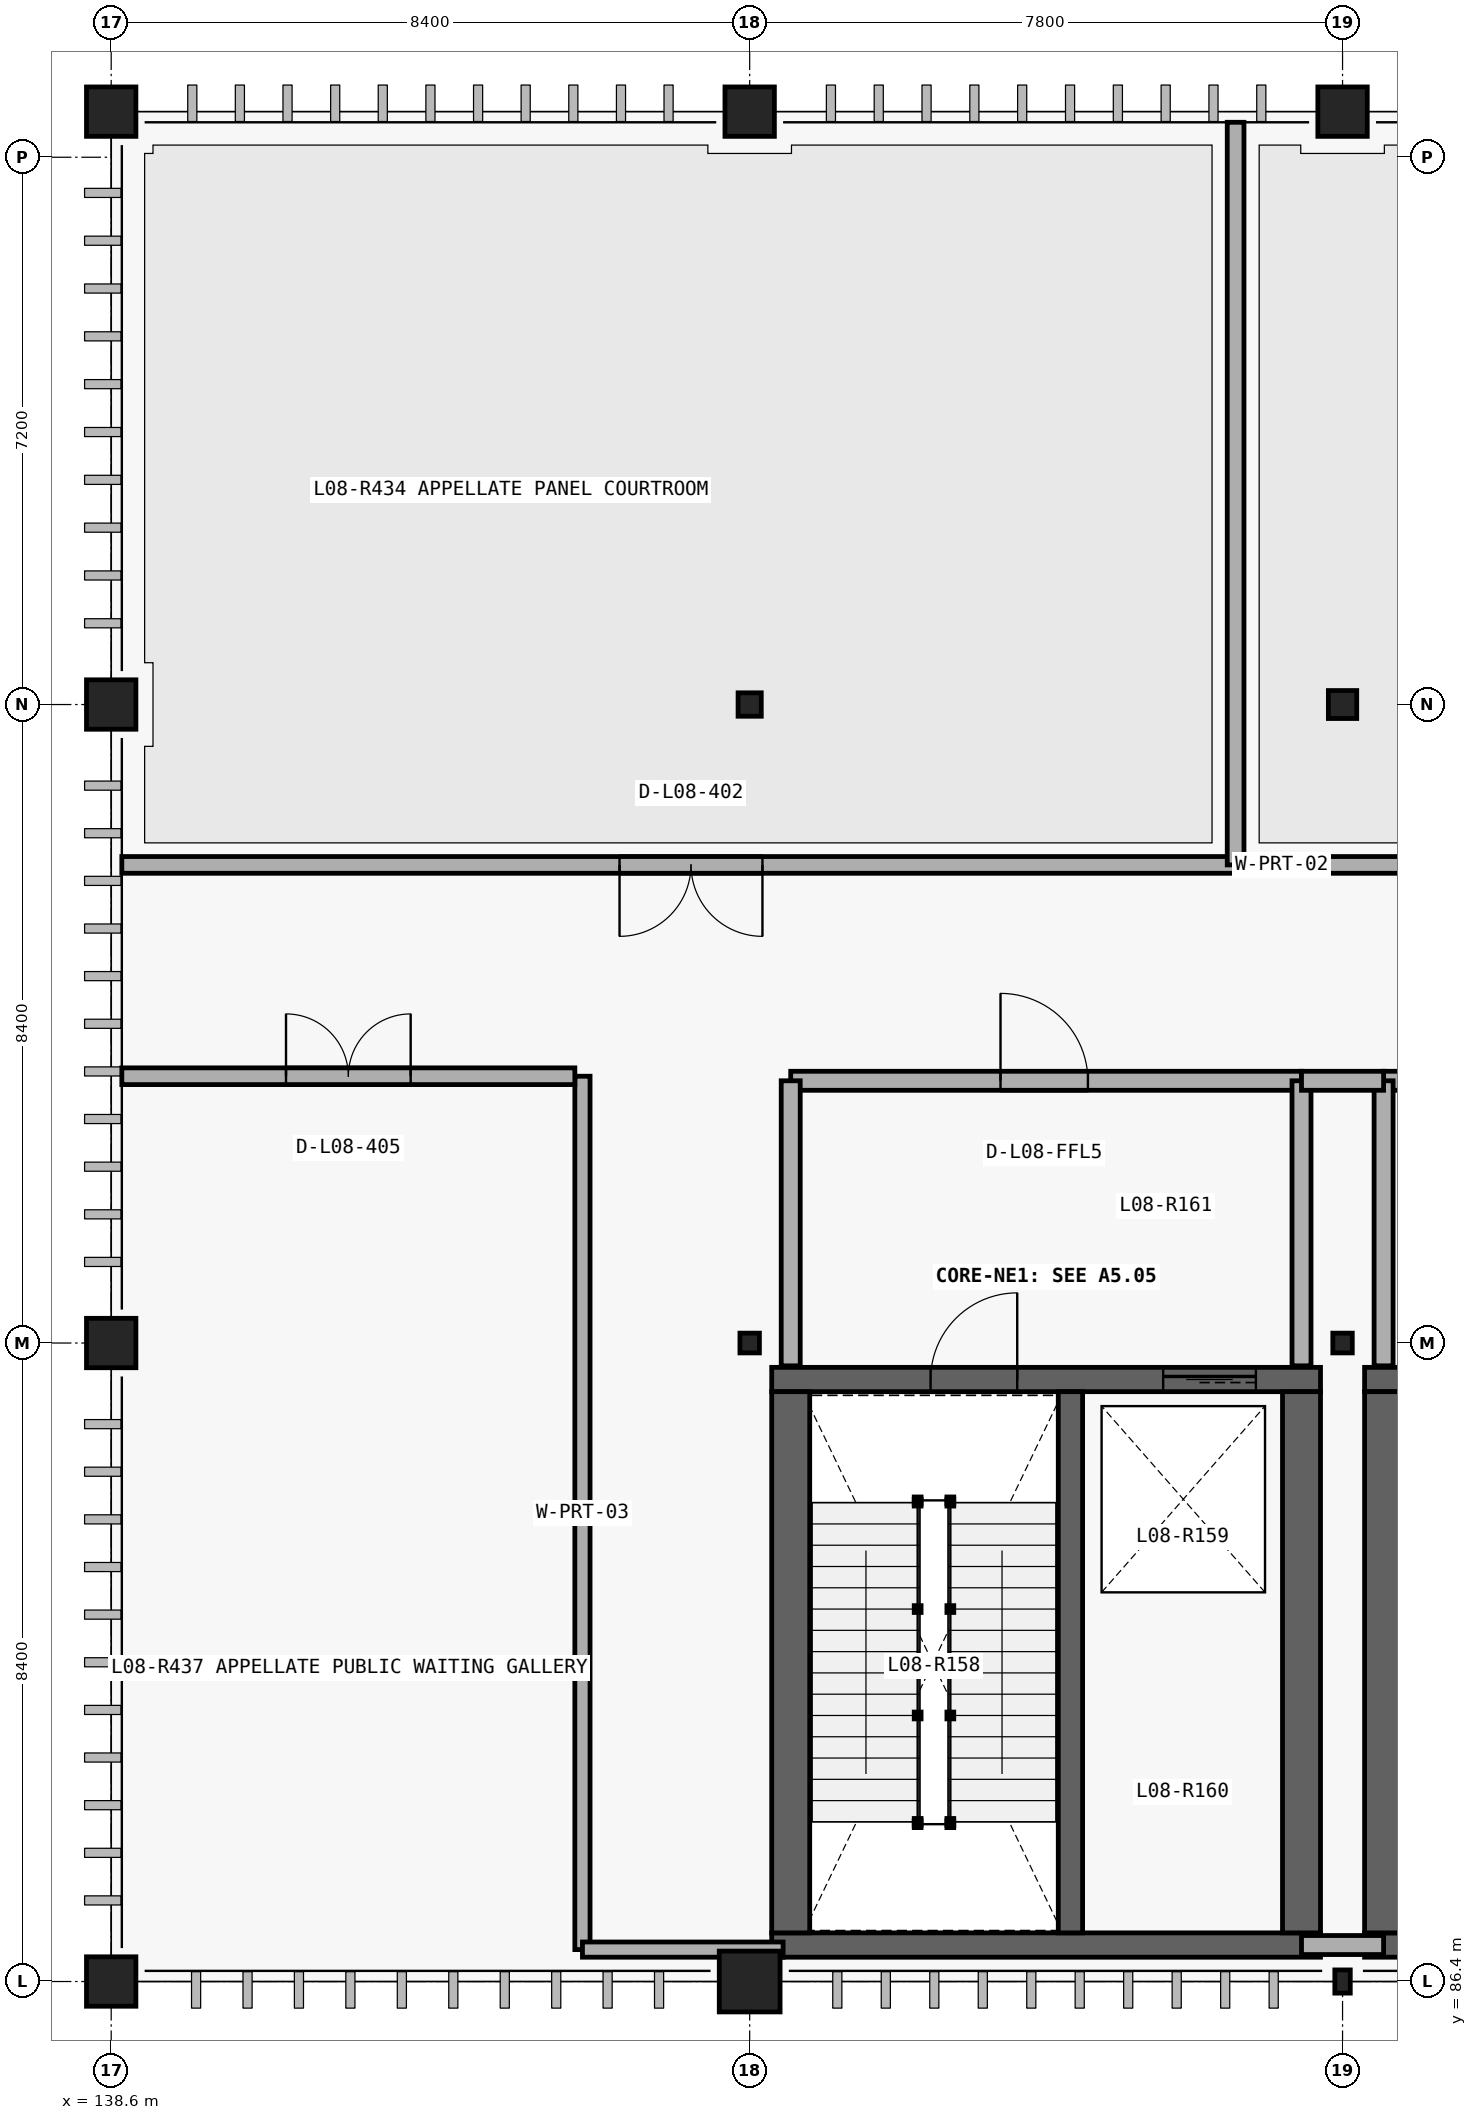
"""IFC4 building model, lengths in metres.
Left out: names, types, materials, properties, quantities, classifications, styles, units other than length and angle.
Written with IfcOpenShell. Run it as: python <this file> out.ifc"""

import sys

from ifc_helpers import new_model, si_unit, direction, frame, frame_2d, origin_with_axes, origin_2d_with_axis, place, context, subcontext, project, spatial, rectangle, hollow_rectangle, circle, i_section, extrude, element, fill, save


model = new_model("IFC4")
c1 = context("Model", 3, precision=1e-05, world=origin_with_axes(), true_north=direction((0.0, 1.0)))
c2 = subcontext(c1, "Body", "Model", "MODEL_VIEW")
j1 = project(units=[si_unit("LENGTHUNIT", "METRE"), si_unit("PLANEANGLEUNIT", "RADIAN")], contexts=[c1])
p1 = place(None, origin_with_axes())
s1 = spatial("IfcSite", under=j1, at=p1, CompositionType="ELEMENT")
p2 = place(p1, origin_with_axes())
s2 = spatial("IfcBuilding", under=s1, at=p2, CompositionType="ELEMENT")
p3 = place(p2, frame((0.0, 0.0, 39.0), z_axis=(0.0, 0.0, 1.0), x_axis=(1.0, 0.0, 0.0)))
s3 = spatial("IfcBuildingStorey", under=s2, at=p3, CompositionType="ELEMENT", Elevation=39.0)
p4 = place(None, frame((147.29, 86.88, 39.0), z_axis=(0.0, 0.0, 1.0), x_axis=(1.0, 0.0, 0.0)))
e1 = element("IfcWall", 1, at=p4, inside=s3, PredefinedType="SHEAR", context=c2, shape_type="SweptSolid", body=[
    extrude(rectangle(XDim=7.22, YDim=0.32, at=frame_2d((3.61, 0.0), x_axis=(1.0, 0.0))), origin_with_axes(), (0.0, 0.0, 1.0), 4.5),
])
p5 = place(None, frame((154.51, 94.32, 39.0), z_axis=(0.0, 0.0, 1.0), x_axis=(-1.0, 0.0, 0.0)))
e2 = element("IfcWall", 2, at=p5, inside=s3, PredefinedType="SHEAR", context=c2, shape_type="SweptSolid", body=[
    extrude(rectangle(XDim=7.22, YDim=0.32, at=frame_2d((3.61, 0.0), x_axis=(1.0, 0.0))), origin_with_axes(), (0.0, 0.0, 1.0), 4.5),
])
p6 = place(None, frame((149.95, 94.32, 39.0), z_axis=(0.0, 0.0, 1.0), x_axis=(-1.0, 0.0, 0.0)))
e3 = element("IfcOpeningElement", 3, at=p6, cuts=e2, PredefinedType="OPENING", context=c2, shape_type="SweptSolid", body=[
    extrude(rectangle(XDim=1.14, YDim=2.18, at=frame_2d((0.0, 1.09), x_axis=(1.0, 0.0))), frame((0.0, 0.17, 0.0), z_axis=(0.0, -1.0, 0.0), x_axis=(1.0, 0.0, 0.0)), (0.0, 0.0, 1.0), 0.34),
])
p7 = place(None, frame((153.05, 94.32, 39.0), z_axis=(0.0, 0.0, 1.0), x_axis=(-1.0, 0.0, 0.0)))
e4 = element("IfcOpeningElement", 4, at=p7, cuts=e2, PredefinedType="OPENING", context=c2, shape_type="SweptSolid", body=[
    extrude(rectangle(XDim=1.22, YDim=2.28, at=frame_2d((0.0, 1.14), x_axis=(1.0, 0.0))), frame((0.0, 0.17, 0.0), z_axis=(0.0, -1.0, 0.0), x_axis=(1.0, 0.0, 0.0)), (0.0, 0.0, 1.0), 0.34),
])
for number, where, z_axis, x_axis in (
    (5, (154.26, 87.04, 39.0), (0.0, 0.0, 1.0), (0.0, 1.0, 0.0)),
    (6, (147.54, 94.16, 39.0), (0.0, 0.0, 1.0), (0.0, -1.0, 0.0)),
):
    element("IfcWall", number, at=place(None, frame(where, z_axis=z_axis, x_axis=x_axis)), inside=s3, PredefinedType="SHEAR", context=c2, shape_type="SweptSolid", body=[
        extrude(rectangle(XDim=7.12, YDim=0.5, at=frame_2d((3.56, 0.0), x_axis=(1.0, 0.0))), origin_with_axes(), (0.0, 0.0, 1.0), 4.5),
    ])
p8 = place(None, frame((151.22, 87.04, 39.0), z_axis=(0.0, 0.0, 1.0), x_axis=(0.0, 1.0, 0.0)))
e7 = element("IfcWall", 7, at=p8, inside=s3, PredefinedType="SHEAR", context=c2, shape_type="SweptSolid", body=[
    extrude(rectangle(XDim=7.12, YDim=0.32, at=frame_2d((3.56, 0.0), x_axis=(1.0, 0.0))), origin_with_axes(), (0.0, 0.0, 1.0), 4.5),
])
p9 = place(None, frame((154.26, 98.25, 39.0), z_axis=(0.0, 0.0, 1.0), x_axis=(-1.0, 0.0, 0.0)))
e8 = element("IfcWall", 8, at=p9, inside=s3, PredefinedType="PARTITIONING", context=c2, shape_type="SweptSolid", body=[
    extrude(rectangle(XDim=6.72, YDim=0.25, at=frame_2d((3.36, 0.0), x_axis=(1.0, 0.0))), origin_with_axes(), (0.0, 0.0, 1.0), 4.18),
])
p10 = place(None, frame((150.875, 98.25, 39.0), z_axis=(0.0, 0.0, 1.0), x_axis=(-1.0, 0.0, 0.0)))
e9 = element("IfcOpeningElement", 9, at=p10, cuts=e8, PredefinedType="OPENING", context=c2, shape_type="SweptSolid", body=[
    extrude(rectangle(XDim=1.15, YDim=2.25, at=frame_2d((0.0, 1.125), x_axis=(1.0, 0.0))), frame((0.0, 0.135, 0.0), z_axis=(0.0, -1.0, 0.0), x_axis=(1.0, 0.0, 0.0)), (0.0, 0.0, 1.0), 0.27),
])
for number, where, z_axis, x_axis in (
    (10, (147.54, 94.5, 39.0), (0.0, 0.0, 1.0), (0.0, 1.0, 0.0)),
    (11, (154.26, 94.5, 39.0), (0.0, 0.0, 1.0), (0.0, 1.0, 0.0)),
):
    element("IfcWall", number, at=place(None, frame(where, z_axis=z_axis, x_axis=x_axis)), inside=s3, PredefinedType="PARTITIONING", context=c2, shape_type="SweptSolid", body=[
        extrude(rectangle(XDim=3.75, YDim=0.25, at=frame_2d((1.875, 0.0), x_axis=(1.0, 0.0))), origin_with_axes(), (0.0, 0.0, 1.0), 4.18),
    ])
p11 = place(None, frame((155.09, 86.88, 39.0), z_axis=(0.0, 0.0, 1.0), x_axis=(1.0, 0.0, 0.0)))
e12 = element("IfcWall", 12, at=p11, inside=s3, PredefinedType="SHEAR", context=c2, shape_type="SweptSolid", body=[
    extrude(rectangle(XDim=7.22, YDim=0.32, at=frame_2d((3.61, 0.0), x_axis=(1.0, 0.0))), origin_with_axes(), (0.0, 0.0, 1.0), 4.5),
])
p12 = place(None, frame((162.31, 94.32, 39.0), z_axis=(0.0, 0.0, 1.0), x_axis=(-1.0, 0.0, 0.0)))
e13 = element("IfcWall", 13, at=p12, inside=s3, PredefinedType="SHEAR", context=c2, shape_type="SweptSolid", body=[
    extrude(rectangle(XDim=7.22, YDim=0.32, at=frame_2d((3.61, 0.0), x_axis=(1.0, 0.0))), origin_with_axes(), (0.0, 0.0, 1.0), 4.5),
])
p13 = place(None, frame((157.75, 94.32, 39.0), z_axis=(0.0, 0.0, 1.0), x_axis=(-1.0, 0.0, 0.0)))
e14 = element("IfcOpeningElement", 14, at=p13, cuts=e13, PredefinedType="OPENING", context=c2, shape_type="SweptSolid", body=[
    extrude(rectangle(XDim=1.14, YDim=2.18, at=frame_2d((0.0, 1.09), x_axis=(1.0, 0.0))), frame((0.0, 0.17, 0.0), z_axis=(0.0, -1.0, 0.0), x_axis=(1.0, 0.0, 0.0)), (0.0, 0.0, 1.0), 0.34),
])
p14 = place(None, frame((160.85, 94.32, 39.0), z_axis=(0.0, 0.0, 1.0), x_axis=(-1.0, 0.0, 0.0)))
e15 = element("IfcOpeningElement", 15, at=p14, cuts=e13, PredefinedType="OPENING", context=c2, shape_type="SweptSolid", body=[
    extrude(rectangle(XDim=1.22, YDim=2.28, at=frame_2d((0.0, 1.14), x_axis=(1.0, 0.0))), frame((0.0, 0.17, 0.0), z_axis=(0.0, -1.0, 0.0), x_axis=(1.0, 0.0, 0.0)), (0.0, 0.0, 1.0), 0.34),
])
p15 = place(None, frame((155.34, 94.16, 39.0), z_axis=(0.0, 0.0, 1.0), x_axis=(0.0, -1.0, 0.0)))
e16 = element("IfcWall", 16, at=p15, inside=s3, PredefinedType="SHEAR", context=c2, shape_type="SweptSolid", body=[
    extrude(rectangle(XDim=7.12, YDim=0.5, at=frame_2d((3.56, 0.0), x_axis=(1.0, 0.0))), origin_with_axes(), (0.0, 0.0, 1.0), 4.5),
])
p16 = place(None, frame((162.06, 98.25, 39.0), z_axis=(0.0, 0.0, 1.0), x_axis=(-1.0, 0.0, 0.0)))
e17 = element("IfcWall", 17, at=p16, inside=s3, PredefinedType="PARTITIONING", context=c2, shape_type="SweptSolid", body=[
    extrude(rectangle(XDim=6.72, YDim=0.25, at=frame_2d((3.36, 0.0), x_axis=(1.0, 0.0))), origin_with_axes(), (0.0, 0.0, 1.0), 4.18),
])
p17 = place(None, frame((158.675, 98.25, 39.0), z_axis=(0.0, 0.0, 1.0), x_axis=(-1.0, 0.0, 0.0)))
e18 = element("IfcOpeningElement", 18, at=p17, cuts=e17, PredefinedType="OPENING", context=c2, shape_type="SweptSolid", body=[
    extrude(rectangle(XDim=1.15, YDim=2.25, at=frame_2d((0.0, 1.125), x_axis=(1.0, 0.0))), frame((0.0, 0.135, 0.0), z_axis=(0.0, -1.0, 0.0), x_axis=(1.0, 0.0, 0.0)), (0.0, 0.0, 1.0), 0.27),
])
p18 = place(None, frame((155.34, 94.5, 39.0), z_axis=(0.0, 0.0, 1.0), x_axis=(0.0, 1.0, 0.0)))
e19 = element("IfcWall", 19, at=p18, inside=s3, PredefinedType="PARTITIONING", context=c2, shape_type="SweptSolid", body=[
    extrude(rectangle(XDim=3.75, YDim=0.25, at=frame_2d((1.875, 0.0), x_axis=(1.0, 0.0))), origin_with_axes(), (0.0, 0.0, 1.0), 4.18),
])
for number, where, z_axis, x_axis in (
    (20, (154.26, 98.25, 39.0), (0.0, 0.0, 1.0), (1.0, 0.0, 0.0)),
    (21, (154.26, 86.88, 39.0), (0.0, 0.0, 1.0), (1.0, 0.0, 0.0)),
):
    element("IfcWall", number, at=place(None, frame(where, z_axis=z_axis, x_axis=x_axis)), inside=s3, PredefinedType="PARTITIONING", context=c2, shape_type="SweptSolid", body=[
        extrude(rectangle(XDim=1.08, YDim=0.25, at=frame_2d((0.54, 0.0), x_axis=(1.0, 0.0))), origin_with_axes(), (0.0, 0.0, 1.0), 4.18),
    ])
p19 = place(None, frame((144.8, 86.82, 39.0), z_axis=(0.0, 0.0, 1.0), x_axis=(0.0, 1.0, 0.0)))
e22 = element("IfcWall", 22, at=p19, inside=s3, PredefinedType="PARTITIONING", context=c2, shape_type="SweptSolid", body=[
    extrude(rectangle(XDim=11.49, YDim=0.2, at=frame_2d((5.745, 0.0), x_axis=(1.0, 0.0))), origin_with_axes(), (0.0, 0.0, 1.0), 4.18),
])
p20 = place(None, frame((144.8, 86.82, 39.0), z_axis=(0.0, 0.0, 1.0), x_axis=(1.0, 0.0, 0.0)))
e23 = element("IfcWall", 23, at=p20, inside=s3, PredefinedType="PARTITIONING", context=c2, shape_type="SweptSolid", body=[
    extrude(rectangle(XDim=2.64, YDim=0.2, at=frame_2d((1.32, 0.0), x_axis=(1.0, 0.0))), origin_with_axes(), (0.0, 0.0, 1.0), 4.18),
])
p21 = place(None, frame((138.74, 101.09, 39.0), z_axis=(0.0, 0.0, 1.0), x_axis=(1.0, 0.0, 0.0)))
e24 = element("IfcWall", 24, at=p21, inside=s3, PredefinedType="PARTITIONING", context=c2, shape_type="SweptSolid", body=[
    extrude(rectangle(XDim=30.52, YDim=0.22, at=frame_2d((15.26, 0.0), x_axis=(1.0, 0.0))), origin_with_axes(), (0.0, 0.0, 1.0), 4.18),
])
p22 = place(None, frame((146.228, 101.09, 39.0), z_axis=(0.0, 0.0, 1.0), x_axis=(1.0, 0.0, 0.0)))
e25 = element("IfcOpeningElement", 25, at=p22, cuts=e24, PredefinedType="OPENING", context=c2, shape_type="SweptSolid", body=[
    extrude(rectangle(XDim=1.88, YDim=2.56, at=frame_2d((0.0, 1.28), x_axis=(1.0, 0.0))), frame((0.0, 0.12, 0.0), z_axis=(0.0, -1.0, 0.0), x_axis=(1.0, 0.0, 0.0)), (0.0, 0.0, 1.0), 0.24),
])
p23 = place(None, frame((159.666, 101.09, 39.0), z_axis=(0.0, 0.0, 1.0), x_axis=(1.0, 0.0, 0.0)))
e26 = element("IfcOpeningElement", 26, at=p23, cuts=e24, PredefinedType="OPENING", context=c2, shape_type="SweptSolid", body=[
    extrude(rectangle(XDim=0.94, YDim=2.3, at=frame_2d((0.0, 1.15), x_axis=(1.0, 0.0))), frame((0.0, 0.12, 0.0), z_axis=(0.0, -1.0, 0.0), x_axis=(1.0, 0.0, 0.0)), (0.0, 0.0, 1.0), 0.24),
])
p24 = place(None, frame((167.438, 101.09, 39.0), z_axis=(0.0, 0.0, 1.0), x_axis=(1.0, 0.0, 0.0)))
e27 = element("IfcOpeningElement", 27, at=p24, cuts=e24, PredefinedType="OPENING", context=c2, shape_type="SweptSolid", body=[
    extrude(rectangle(XDim=0.91, YDim=2.12, at=frame_2d((0.0, 1.06), x_axis=(1.0, 0.0))), frame((0.0, 0.12, 0.0), z_axis=(0.0, -1.0, 0.0), x_axis=(1.0, 0.0, 0.0)), (0.0, 0.0, 1.0), 0.24),
])
p25 = place(None, frame((138.74, 98.31, 39.0), z_axis=(0.0, 0.0, 1.0), x_axis=(1.0, 0.0, 0.0)))
e28 = element("IfcWall", 28, at=p25, inside=s3, PredefinedType="PARTITIONING", context=c2, shape_type="SweptSolid", body=[
    extrude(rectangle(XDim=5.96, YDim=0.22, at=frame_2d((2.98, 0.0), x_axis=(1.0, 0.0))), origin_with_axes(), (0.0, 0.0, 1.0), 4.18),
])
p26 = place(None, frame((141.72, 98.31, 39.0), z_axis=(0.0, 0.0, 1.0), x_axis=(1.0, 0.0, 0.0)))
e29 = element("IfcOpeningElement", 29, at=p26, cuts=e28, PredefinedType="OPENING", context=c2, shape_type="SweptSolid", body=[
    extrude(rectangle(XDim=1.64, YDim=2.42, at=frame_2d((0.0, 1.21), x_axis=(1.0, 0.0))), frame((0.0, 0.12, 0.0), z_axis=(0.0, -1.0, 0.0), x_axis=(1.0, 0.0, 0.0)), (0.0, 0.0, 1.0), 0.24),
])
p27 = place(None, frame((153.393, 101.09, 39.0), z_axis=(0.0, 0.0, 1.0), x_axis=(0.0, 1.0, 0.0)))
e30 = element("IfcWall", 30, at=p27, inside=s3, PredefinedType="PARTITIONING", context=c2, shape_type="SweptSolid", body=[
    extrude(rectangle(XDim=9.77, YDim=0.22, at=frame_2d((4.885, 0.0), x_axis=(1.0, 0.0))), origin_with_axes(), (0.0, 0.0, 1.0), 4.18),
])
for number, where, z_axis, x_axis in (
    (31, (138.6, 86.4, 39.0), (0.0, 0.0, 1.0), (1.0, 0.0, 0.0)),
    (32, (138.6, 94.8, 39.0), (0.0, 0.0, 1.0), (1.0, 0.0, 0.0)),
    (33, (138.6, 103.2, 39.0), (0.0, 0.0, 1.0), (1.0, 0.0, 0.0)),
    (34, (138.6, 111.0, 39.0), (0.0, 0.0, 1.0), (1.0, 0.0, 0.0)),
):
    element("IfcColumn", number, at=place(None, frame(where, z_axis=z_axis, x_axis=x_axis)), inside=s3, PredefinedType="COLUMN", context=c2, shape_type="SweptSolid", body=[
        extrude(circle(Radius=0.325, at=origin_2d_with_axis()), origin_with_axes(), (0.0, 0.0, 1.0), 4.5),
    ])
p28 = place(None, frame((147.0, 86.4, 39.0), z_axis=(0.0, 0.0, 1.0), x_axis=(1.0, 0.0, 0.0)))
e35 = element("IfcColumn", 35, at=p28, inside=s3, PredefinedType="COLUMN", context=c2, shape_type="SweptSolid", body=[
    extrude(circle(Radius=0.4, at=origin_2d_with_axis()), origin_with_axes(), (0.0, 0.0, 1.0), 4.5),
])
p29 = place(None, frame((147.0, 94.8, 39.0), z_axis=(0.0, 0.0, 1.0), x_axis=(1.0, 0.0, 0.0)))
e36 = element("IfcColumn", 36, at=p29, inside=s3, PredefinedType="COLUMN", context=c2, shape_type="SweptSolid", body=[
    extrude(i_section(OverallWidth=0.256, OverallDepth=0.26, WebThickness=0.011, FlangeThickness=0.017, at=origin_2d_with_axis()), origin_with_axes(), (0.0, 0.0, 1.0), 4.5),
])
p30 = place(None, frame((147.0, 103.2, 39.0), z_axis=(0.0, 0.0, 1.0), x_axis=(1.0, 0.0, 0.0)))
e37 = element("IfcColumn", 37, at=p30, inside=s3, PredefinedType="COLUMN", context=c2, shape_type="SweptSolid", body=[
    extrude(i_section(OverallWidth=0.305, OverallDepth=0.308, WebThickness=0.01, FlangeThickness=0.015, at=origin_2d_with_axis()), origin_with_axes(), (0.0, 0.0, 1.0), 4.5),
])
p31 = place(None, frame((147.0, 111.0, 39.0), z_axis=(0.0, 0.0, 1.0), x_axis=(1.0, 0.0, 0.0)))
e38 = element("IfcColumn", 38, at=p31, inside=s3, PredefinedType="COLUMN", context=c2, shape_type="SweptSolid", body=[
    extrude(circle(Radius=0.325, at=origin_2d_with_axis()), origin_with_axes(), (0.0, 0.0, 1.0), 4.5),
])
p32 = place(None, frame((154.8, 86.4, 39.0), z_axis=(0.0, 0.0, 1.0), x_axis=(1.0, 0.0, 0.0)))
e39 = element("IfcColumn", 39, at=p32, inside=s3, PredefinedType="COLUMN", context=c2, shape_type="SweptSolid", body=[
    extrude(hollow_rectangle(XDim=0.203, YDim=0.305, WallThickness=0.013, InnerFilletRadius=0.025, OuterFilletRadius=0.013, at=origin_2d_with_axis()), origin_with_axes(), (0.0, 0.0, 1.0), 4.5),
])
p33 = place(None, frame((154.8, 94.8, 39.0), z_axis=(0.0, 0.0, 1.0), x_axis=(1.0, 0.0, 0.0)))
e40 = element("IfcColumn", 40, at=p33, inside=s3, PredefinedType="COLUMN", context=c2, shape_type="SweptSolid", body=[
    extrude(i_section(OverallWidth=0.256, OverallDepth=0.26, WebThickness=0.011, FlangeThickness=0.017, at=origin_2d_with_axis()), origin_with_axes(), (0.0, 0.0, 1.0), 4.5),
])
p34 = place(None, frame((154.8, 103.2, 39.0), z_axis=(0.0, 0.0, 1.0), x_axis=(1.0, 0.0, 0.0)))
e41 = element("IfcColumn", 41, at=p34, inside=s3, PredefinedType="COLUMN", context=c2, shape_type="SweptSolid", body=[
    extrude(i_section(OverallWidth=0.373, OverallDepth=0.368, WebThickness=0.015, FlangeThickness=0.024, at=origin_2d_with_axis()), origin_with_axes(), (0.0, 0.0, 1.0), 4.5),
])
p35 = place(None, frame((154.8, 111.0, 39.0), z_axis=(0.0, 0.0, 1.0), x_axis=(1.0, 0.0, 0.0)))
e42 = element("IfcColumn", 42, at=p35, inside=s3, PredefinedType="COLUMN", context=c2, shape_type="SweptSolid", body=[
    extrude(circle(Radius=0.325, at=origin_2d_with_axis()), origin_with_axes(), (0.0, 0.0, 1.0), 4.5),
])
p36 = place(None, frame((149.95, 94.32, 39.0), z_axis=(0.0, 0.0, 1.0), x_axis=(1.0, 0.0, 0.0)))
e43 = element("IfcDoor", 43, at=p36, inside=s3, OperationType="SINGLE_SWING_LEFT", PredefinedType="DOOR", context=c2, shape_type="SweptSolid", body=[
    extrude(rectangle(XDim=1.14, YDim=2.18, at=frame_2d((0.0, 1.09), x_axis=(1.0, 0.0))), frame((0.0, 0.04, 0.0), z_axis=(0.0, -1.0, 0.0), x_axis=(1.0, 0.0, 0.0)), (0.0, 0.0, 1.0), 0.08),
])
fill(e3, e43)
p37 = place(None, frame((153.05, 94.32, 39.0), z_axis=(0.0, 0.0, 1.0), x_axis=(1.0, 0.0, 0.0)))
e44 = element("IfcDoor", 44, at=p37, inside=s3, OperationType="SLIDING_TO_LEFT", PredefinedType="DOOR", context=c2, shape_type="SweptSolid", body=[
    extrude(rectangle(XDim=1.22, YDim=2.28, at=frame_2d((0.0, 1.14), x_axis=(1.0, 0.0))), frame((0.0, 0.04, 0.0), z_axis=(0.0, -1.0, 0.0), x_axis=(1.0, 0.0, 0.0)), (0.0, 0.0, 1.0), 0.08),
])
fill(e4, e44)
p38 = place(None, frame((150.875, 98.25, 39.0), z_axis=(0.0, 0.0, 1.0), x_axis=(1.0, 0.0, 0.0)))
e45 = element("IfcDoor", 45, at=p38, inside=s3, OperationType="SINGLE_SWING_RIGHT", PredefinedType="DOOR", context=c2, shape_type="SweptSolid", body=[
    extrude(rectangle(XDim=1.15, YDim=2.25, at=frame_2d((0.0, 1.125), x_axis=(1.0, 0.0))), frame((0.0, 0.04, 0.0), z_axis=(0.0, -1.0, 0.0), x_axis=(1.0, 0.0, 0.0)), (0.0, 0.0, 1.0), 0.08),
])
fill(e9, e45)
p39 = place(None, frame((146.228, 101.09, 39.0), z_axis=(0.0, 0.0, 1.0), x_axis=(-1.0, 0.0, 0.0)))
e46 = element("IfcDoor", 46, at=p39, inside=s3, OperationType="DOUBLE_DOOR_SINGLE_SWING", PredefinedType="DOOR", context=c2, shape_type="SweptSolid", body=[
    extrude(rectangle(XDim=1.88, YDim=2.56, at=frame_2d((0.0, 1.28), x_axis=(1.0, 0.0))), frame((0.0, 0.04, 0.0), z_axis=(0.0, -1.0, 0.0), x_axis=(1.0, 0.0, 0.0)), (0.0, 0.0, 1.0), 0.08),
])
fill(e25, e46)
p40 = place(None, frame((141.72, 98.31, 39.0), z_axis=(0.0, 0.0, 1.0), x_axis=(1.0, 0.0, 0.0)))
e47 = element("IfcDoor", 47, at=p40, inside=s3, OperationType="DOUBLE_DOOR_SINGLE_SWING", PredefinedType="DOOR", context=c2, shape_type="SweptSolid", body=[
    extrude(rectangle(XDim=1.64, YDim=2.42, at=frame_2d((0.0, 1.21), x_axis=(1.0, 0.0))), frame((0.0, 0.04, 0.0), z_axis=(0.0, -1.0, 0.0), x_axis=(1.0, 0.0, 0.0)), (0.0, 0.0, 1.0), 0.08),
])
fill(e29, e47)
save(model, sys.argv[1])
